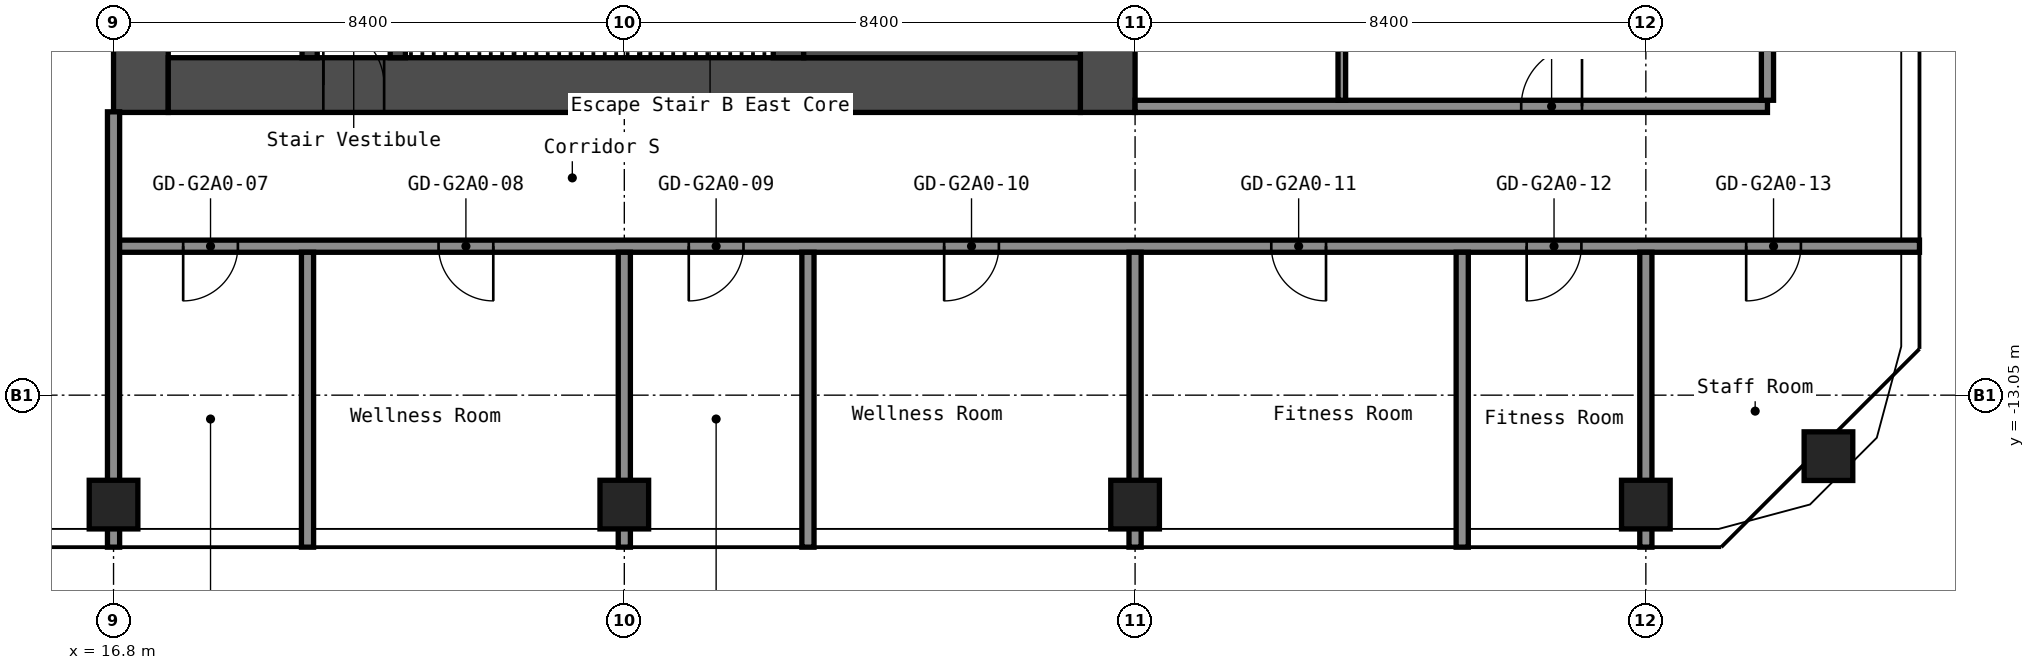
"""IFC4 building model, lengths in metres.
Left out: names, types, materials, properties, quantities, classifications, styles, units other than length and angle.
Written with IfcOpenShell. Run it as: python <this file> out.ifc"""

import sys

from ifc_helpers import new_model, si_unit, direction, frame, frame_2d, origin, origin_2d, place, context, subcontext, project, spatial, rectangle, hollow_rectangle, extrude, element, fill, save


model = new_model("IFC4")
c1 = context("Model", 3, precision=1e-05, world=origin(), true_north=direction((0.0, 1.0)))
c2 = subcontext(c1, "Body", "Model", "MODEL_VIEW")
j1 = project(units=[si_unit("LENGTHUNIT", "METRE"), si_unit("PLANEANGLEUNIT", "RADIAN")], contexts=[c1])
p1 = place(None, origin())
s1 = spatial("IfcSite", under=j1, at=p1, CompositionType="ELEMENT")
p2 = place(p1, origin())
s2 = spatial("IfcBuilding", under=s1, at=p2, CompositionType="ELEMENT")
p3 = place(p2, frame((0.0, 0.0, 75.4)))
s3 = spatial("IfcBuildingStorey", under=s2, at=p3, CompositionType="ELEMENT", Elevation=75.4)
for number, where, z_axis, x_axis in (
    (1, (16.8, -14.85, 0.0), (0.0, 0.0, 1.0), (1.0, 0.0, 0.0)),
    (2, (25.2, -14.85, 0.0), (0.0, 0.0, 1.0), (1.0, 0.0, 0.0)),
    (3, (33.6, -14.85, 0.0), (0.0, 0.0, 1.0), (1.0, 0.0, 0.0)),
    (4, (42.0, -14.85, 0.0), (0.0, 0.0, 1.0), (1.0, 0.0, 0.0)),
    (5, (45.003, -14.053, 0.0), (0.0, 0.0, 1.0), (1.0, 0.0, 0.0)),
):
    element("IfcColumn", number, at=place(p3, frame(where, z_axis=z_axis, x_axis=x_axis)), inside=s3, PredefinedType="COLUMN", context=c2, shape_type="SweptSolid", body=[
        extrude(hollow_rectangle(XDim=0.8, YDim=0.8, WallThickness=0.032, at=origin_2d()), origin(), (0.0, 0.0, 1.0), 2.8),
    ])
p4 = place(p3, frame((17.25, -8.4, 0.0), z_axis=(0.0, 0.0, 1.0), x_axis=(0.0, 1.0, 0.0)))
e6 = element("IfcWall", 6, at=p4, inside=s3, PredefinedType="SHEAR", context=c2, shape_type="SweptSolid", body=[
    extrude(rectangle(XDim=16.8, YDim=0.9, at=frame_2d((8.4, 0.0))), origin(), (0.0, 0.0, 1.0), 2.8),
])
p5 = place(p4, frame((7.6, 0.0, 0.0)))
e7 = element("IfcOpeningElement", 7, at=p5, cuts=e6, PredefinedType="OPENING", context=c2, shape_type="SweptSolid", body=[
    extrude(rectangle(XDim=1.2, YDim=2.1, at=frame_2d((0.6, 1.05))), frame((0.0, 0.46, 0.0), z_axis=(0.0, -1.0, 0.0), x_axis=(1.0, 0.0, 0.0)), (0.0, 0.0, 1.0), 0.92),
])
p6 = place(p3, frame((33.15, -8.4, 0.0), z_axis=(0.0, 0.0, 1.0), x_axis=(0.0, 1.0, 0.0)))
e8 = element("IfcWall", 8, at=p6, inside=s3, PredefinedType="SHEAR", context=c2, shape_type="SweptSolid", body=[
    extrude(rectangle(XDim=16.8, YDim=0.9, at=frame_2d((8.4, 0.0))), origin(), (0.0, 0.0, 1.0), 2.8),
])
p7 = place(p3, frame((17.7, -7.95, 0.0), z_axis=(0.0, 0.0, 1.0), x_axis=(1.0, 0.0, 0.0)))
e9 = element("IfcWall", 9, at=p7, inside=s3, PredefinedType="SHEAR", context=c2, shape_type="SweptSolid", body=[
    extrude(rectangle(XDim=15.0, YDim=0.9, at=frame_2d((7.5, 0.0))), origin(), (0.0, 0.0, 1.0), 2.8),
])
p8 = place(p7, frame((2.55, 0.0, 0.0)))
e10 = element("IfcOpeningElement", 10, at=p8, cuts=e9, PredefinedType="OPENING", context=c2, shape_type="SweptSolid", body=[
    extrude(rectangle(XDim=1.0, YDim=2.1, at=frame_2d((0.5, 1.05))), frame((0.0, 0.46, 0.0), z_axis=(0.0, -1.0, 0.0), x_axis=(1.0, 0.0, 0.0)), (0.0, 0.0, 1.0), 0.92),
])
p9 = place(p3, frame((20.025, -7.5, 0.0), z_axis=(0.0, 0.0, 1.0), x_axis=(0.0, 1.0, 0.0)))
e11 = element("IfcWall", 11, at=p9, inside=s3, PredefinedType="SHEAR", context=c2, shape_type="SweptSolid", body=[
    extrude(rectangle(XDim=6.3, YDim=0.25, at=frame_2d((3.15, 0.0))), origin(), (0.0, 0.0, 1.0), 2.8),
])
p10 = place(p9, frame((2.4, 0.0, 0.0)))
e12 = element("IfcOpeningElement", 12, at=p10, cuts=e11, PredefinedType="OPENING", context=c2, shape_type="SweptSolid", body=[
    extrude(rectangle(XDim=1.0, YDim=2.1, at=frame_2d((0.5, 1.05))), frame((0.0, 0.135, 0.0), z_axis=(0.0, -1.0, 0.0), x_axis=(1.0, 0.0, 0.0)), (0.0, 0.0, 1.0), 0.27),
])
p11 = place(p3, frame((21.475, -7.5, 0.0), z_axis=(0.0, 0.0, 1.0), x_axis=(0.0, 1.0, 0.0)))
e13 = element("IfcWall", 13, at=p11, inside=s3, PredefinedType="SHEAR", context=c2, shape_type="SweptSolid", body=[
    extrude(rectangle(XDim=3.75, YDim=0.25, at=frame_2d((1.875, 0.0))), origin(), (0.0, 0.0, 1.0), 2.8),
])
p12 = place(p11, frame((1.3, 0.0, 0.0)))
e14 = element("IfcOpeningElement", 14, at=p12, cuts=e13, PredefinedType="OPENING", context=c2, shape_type="SweptSolid", body=[
    extrude(rectangle(XDim=1.2, YDim=2.1, at=frame_2d((0.6, 1.05))), frame((0.0, 0.135, 0.0), z_axis=(0.0, -1.0, 0.0), x_axis=(1.0, 0.0, 0.0)), (0.0, 0.0, 1.0), 0.27),
])
p13 = place(p3, frame((27.9, -7.5, 0.0), z_axis=(0.0, 0.0, 1.0), x_axis=(0.0, 1.0, 0.0)))
e15 = element("IfcWall", 15, at=p13, inside=s3, PredefinedType="SHEAR", context=c2, shape_type="SweptSolid", body=[
    extrude(rectangle(XDim=3.75, YDim=0.5, at=frame_2d((1.875, 0.0))), origin(), (0.0, 0.0, 1.0), 2.8),
])
p14 = place(p3, frame((28.15, -6.75, 0.0), z_axis=(0.0, 0.0, 1.0), x_axis=(1.0, 0.0, 0.0)))
e16 = element("IfcWall", 16, at=p14, inside=s3, PredefinedType="SHEAR", context=c2, shape_type="SweptSolid", body=[
    extrude(rectangle(XDim=4.55, YDim=1.5, at=frame_2d((2.275, 0.0))), origin(), (0.0, 0.0, 1.0), 2.8),
])
p15 = place(p3, frame((16.8, -10.6, 0.0), z_axis=(0.0, 0.0, 1.0), x_axis=(1.0, 0.0, 0.0)))
e17 = element("IfcWall", 17, at=p15, inside=s3, PredefinedType="PARTITIONING", context=c2, shape_type="SweptSolid", body=[
    extrude(rectangle(XDim=29.7, YDim=0.2, at=frame_2d((14.85, 0.0))), origin(), (0.0, 0.0, 1.0), 2.8),
])
p16 = place(p15, frame((1.145, 0.0, 0.0)))
e18 = element("IfcOpeningElement", 18, at=p16, cuts=e17, PredefinedType="OPENING", context=c2, shape_type="SweptSolid", body=[
    extrude(rectangle(XDim=0.9, YDim=2.1, at=frame_2d((0.45, 1.05))), frame((0.0, 0.11, 0.0), z_axis=(0.0, -1.0, 0.0), x_axis=(1.0, 0.0, 0.0)), (0.0, 0.0, 1.0), 0.22),
])
p17 = place(p15, frame((5.345, 0.0, 0.0)))
e19 = element("IfcOpeningElement", 19, at=p17, cuts=e17, PredefinedType="OPENING", context=c2, shape_type="SweptSolid", body=[
    extrude(rectangle(XDim=0.9, YDim=2.1, at=frame_2d((0.45, 1.05))), frame((0.0, 0.11, 0.0), z_axis=(0.0, -1.0, 0.0), x_axis=(1.0, 0.0, 0.0)), (0.0, 0.0, 1.0), 0.22),
])
p18 = place(p15, frame((9.46, 0.0, 0.0)))
e20 = element("IfcOpeningElement", 20, at=p18, cuts=e17, PredefinedType="OPENING", context=c2, shape_type="SweptSolid", body=[
    extrude(rectangle(XDim=0.9, YDim=2.1, at=frame_2d((0.45, 1.05))), frame((0.0, 0.11, 0.0), z_axis=(0.0, -1.0, 0.0), x_axis=(1.0, 0.0, 0.0)), (0.0, 0.0, 1.0), 0.22),
])
p19 = place(p15, frame((13.66, 0.0, 0.0)))
e21 = element("IfcOpeningElement", 21, at=p19, cuts=e17, PredefinedType="OPENING", context=c2, shape_type="SweptSolid", body=[
    extrude(rectangle(XDim=0.9, YDim=2.1, at=frame_2d((0.45, 1.05))), frame((0.0, 0.11, 0.0), z_axis=(0.0, -1.0, 0.0), x_axis=(1.0, 0.0, 0.0)), (0.0, 0.0, 1.0), 0.22),
])
p20 = place(p15, frame((19.04, 0.0, 0.0)))
e22 = element("IfcOpeningElement", 22, at=p20, cuts=e17, PredefinedType="OPENING", context=c2, shape_type="SweptSolid", body=[
    extrude(rectangle(XDim=0.9, YDim=2.1, at=frame_2d((0.45, 1.05))), frame((0.0, 0.11, 0.0), z_axis=(0.0, -1.0, 0.0), x_axis=(1.0, 0.0, 0.0)), (0.0, 0.0, 1.0), 0.22),
])
p21 = place(p15, frame((23.24, 0.0, 0.0)))
e23 = element("IfcOpeningElement", 23, at=p21, cuts=e17, PredefinedType="OPENING", context=c2, shape_type="SweptSolid", body=[
    extrude(rectangle(XDim=0.9, YDim=2.1, at=frame_2d((0.45, 1.05))), frame((0.0, 0.11, 0.0), z_axis=(0.0, -1.0, 0.0), x_axis=(1.0, 0.0, 0.0)), (0.0, 0.0, 1.0), 0.22),
])
p22 = place(p15, frame((26.85, 0.0, 0.0)))
e24 = element("IfcOpeningElement", 24, at=p22, cuts=e17, PredefinedType="OPENING", context=c2, shape_type="SweptSolid", body=[
    extrude(rectangle(XDim=0.9, YDim=2.1, at=frame_2d((0.45, 1.05))), frame((0.0, 0.11, 0.0), z_axis=(0.0, -1.0, 0.0), x_axis=(1.0, 0.0, 0.0)), (0.0, 0.0, 1.0), 0.22),
])
p23 = place(p3, frame((33.6, -8.3, 0.0), z_axis=(0.0, 0.0, 1.0), x_axis=(1.0, 0.0, 0.0)))
e25 = element("IfcWall", 25, at=p23, inside=s3, PredefinedType="PARTITIONING", context=c2, shape_type="SweptSolid", body=[
    extrude(rectangle(XDim=10.4, YDim=0.2, at=frame_2d((5.2, 0.0))), origin(), (0.0, 0.0, 1.0), 2.8),
])
p24 = place(p23, frame((6.35, 0.0, 0.0)))
e26 = element("IfcOpeningElement", 26, at=p24, cuts=e25, PredefinedType="OPENING", context=c2, shape_type="SweptSolid", body=[
    extrude(rectangle(XDim=1.0, YDim=2.1, at=frame_2d((0.5, 1.05))), frame((0.0, 0.11, 0.0), z_axis=(0.0, -1.0, 0.0), x_axis=(1.0, 0.0, 0.0)), (0.0, 0.0, 1.0), 0.22),
])
p25 = place(p3, frame((16.8, -15.55, 0.0), z_axis=(0.0, 0.0, 1.0), x_axis=(0.0, 1.0, 0.0)))
e27 = element("IfcWall", 27, at=p25, inside=s3, PredefinedType="PARTITIONING", context=c2, shape_type="SweptSolid", body=[
    extrude(rectangle(XDim=7.16, YDim=0.2, at=frame_2d((3.58, 0.0))), origin(), (0.0, 0.0, 1.0), 2.8),
])
for number, where, z_axis, x_axis in (
    (28, (19.99, -15.55, 0.0), (0.0, 0.0, 1.0), (0.0, 1.0, 0.0)),
    (29, (25.2, -15.55, 0.0), (0.0, 0.0, 1.0), (0.0, 1.0, 0.0)),
    (30, (28.22, -15.55, 0.0), (0.0, 0.0, 1.0), (0.0, 1.0, 0.0)),
    (31, (33.6, -15.55, 0.0), (0.0, 0.0, 1.0), (0.0, 1.0, 0.0)),
):
    element("IfcWall", number, at=place(p3, frame(where, z_axis=z_axis, x_axis=x_axis)), inside=s3, PredefinedType="PARTITIONING", context=c2, shape_type="SweptSolid", body=[
        extrude(rectangle(XDim=4.85, YDim=0.2, at=frame_2d((2.425, 0.0))), origin(), (0.0, 0.0, 1.0), 2.8),
    ])
p26 = place(p3, frame((37.0, -8.2, 0.0), z_axis=(0.0, 0.0, 1.0), x_axis=(0.0, 1.0, 0.0)))
e32 = element("IfcWall", 32, at=p26, inside=s3, PredefinedType="PARTITIONING", context=c2, shape_type="SweptSolid", body=[
    extrude(rectangle(XDim=3.3, YDim=0.125, at=frame_2d((1.65, 0.0))), origin(), (0.0, 0.0, 1.0), 2.8),
])
for number, where, z_axis, x_axis in (
    (33, (38.98, -15.55, 0.0), (0.0, 0.0, 1.0), (0.0, 1.0, 0.0)),
    (34, (42.0, -15.55, 0.0), (0.0, 0.0, 1.0), (0.0, 1.0, 0.0)),
):
    element("IfcWall", number, at=place(p3, frame(where, z_axis=z_axis, x_axis=x_axis)), inside=s3, PredefinedType="PARTITIONING", context=c2, shape_type="SweptSolid", body=[
        extrude(rectangle(XDim=4.85, YDim=0.2, at=frame_2d((2.425, 0.0))), origin(), (0.0, 0.0, 1.0), 2.8),
    ])
p27 = place(p3, frame((44.0, -8.2, 0.0), z_axis=(0.0, 0.0, 1.0), x_axis=(0.0, 1.0, 0.0)))
e35 = element("IfcWall", 35, at=p27, inside=s3, PredefinedType="PARTITIONING", context=c2, shape_type="SweptSolid", body=[
    extrude(rectangle(XDim=16.4, YDim=0.2, at=frame_2d((8.2, 0.0))), origin(), (0.0, 0.0, 1.0), 2.8),
])
p28 = place(p8, origin())
e36 = element("IfcDoor", 36, at=p28, inside=s3, OperationType="SINGLE_SWING_RIGHT", PredefinedType="DOOR", context=c2, shape_type="SweptSolid", body=[
    extrude(rectangle(XDim=1.0, YDim=2.1, at=frame_2d((0.5, 1.05))), frame((0.0, 0.025, 0.0), z_axis=(0.0, -1.0, 0.0), x_axis=(1.0, 0.0, 0.0)), (0.0, 0.0, 1.0), 0.05),
])
fill(e10, e36)
p29 = place(p16, origin())
e37 = element("IfcDoor", 37, at=p29, inside=s3, OperationType="SINGLE_SWING_LEFT", PredefinedType="DOOR", context=c2, shape_type="SweptSolid", body=[
    extrude(rectangle(XDim=0.9, YDim=2.1, at=frame_2d((0.45, 1.05))), frame((0.0, 0.025, 0.0), z_axis=(0.0, -1.0, 0.0), x_axis=(1.0, 0.0, 0.0)), (0.0, 0.0, 1.0), 0.05),
])
fill(e18, e37)
p30 = place(p17, origin())
e38 = element("IfcDoor", 38, at=p30, inside=s3, OperationType="SINGLE_SWING_RIGHT", PredefinedType="DOOR", context=c2, shape_type="SweptSolid", body=[
    extrude(rectangle(XDim=0.9, YDim=2.1, at=frame_2d((0.45, 1.05))), frame((0.0, 0.025, 0.0), z_axis=(0.0, -1.0, 0.0), x_axis=(1.0, 0.0, 0.0)), (0.0, 0.0, 1.0), 0.05),
])
fill(e19, e38)
p31 = place(p18, origin())
e39 = element("IfcDoor", 39, at=p31, inside=s3, OperationType="SINGLE_SWING_LEFT", PredefinedType="DOOR", context=c2, shape_type="SweptSolid", body=[
    extrude(rectangle(XDim=0.9, YDim=2.1, at=frame_2d((0.45, 1.05))), frame((0.0, 0.025, 0.0), z_axis=(0.0, -1.0, 0.0), x_axis=(1.0, 0.0, 0.0)), (0.0, 0.0, 1.0), 0.05),
])
fill(e20, e39)
p32 = place(p19, origin())
e40 = element("IfcDoor", 40, at=p32, inside=s3, OperationType="SINGLE_SWING_LEFT", PredefinedType="DOOR", context=c2, shape_type="SweptSolid", body=[
    extrude(rectangle(XDim=0.9, YDim=2.1, at=frame_2d((0.45, 1.05))), frame((0.0, 0.025, 0.0), z_axis=(0.0, -1.0, 0.0), x_axis=(1.0, 0.0, 0.0)), (0.0, 0.0, 1.0), 0.05),
])
fill(e21, e40)
p33 = place(p20, origin())
e41 = element("IfcDoor", 41, at=p33, inside=s3, OperationType="SINGLE_SWING_RIGHT", PredefinedType="DOOR", context=c2, shape_type="SweptSolid", body=[
    extrude(rectangle(XDim=0.9, YDim=2.1, at=frame_2d((0.45, 1.05))), frame((0.0, 0.025, 0.0), z_axis=(0.0, -1.0, 0.0), x_axis=(1.0, 0.0, 0.0)), (0.0, 0.0, 1.0), 0.05),
])
fill(e22, e41)
p34 = place(p21, origin())
e42 = element("IfcDoor", 42, at=p34, inside=s3, OperationType="SINGLE_SWING_LEFT", PredefinedType="DOOR", context=c2, shape_type="SweptSolid", body=[
    extrude(rectangle(XDim=0.9, YDim=2.1, at=frame_2d((0.45, 1.05))), frame((0.0, 0.025, 0.0), z_axis=(0.0, -1.0, 0.0), x_axis=(1.0, 0.0, 0.0)), (0.0, 0.0, 1.0), 0.05),
])
fill(e23, e42)
p35 = place(p22, origin())
e43 = element("IfcDoor", 43, at=p35, inside=s3, OperationType="SINGLE_SWING_LEFT", PredefinedType="DOOR", context=c2, shape_type="SweptSolid", body=[
    extrude(rectangle(XDim=0.9, YDim=2.1, at=frame_2d((0.45, 1.05))), frame((0.0, 0.025, 0.0), z_axis=(0.0, -1.0, 0.0), x_axis=(1.0, 0.0, 0.0)), (0.0, 0.0, 1.0), 0.05),
])
fill(e24, e43)
p36 = place(p24, origin())
e44 = element("IfcDoor", 44, at=p36, inside=s3, OperationType="SINGLE_SWING_LEFT", PredefinedType="DOOR", context=c2, shape_type="SweptSolid", body=[
    extrude(rectangle(XDim=1.0, YDim=2.1, at=frame_2d((0.5, 1.05))), frame((0.0, 0.025, 0.0), z_axis=(0.0, -1.0, 0.0), x_axis=(1.0, 0.0, 0.0)), (0.0, 0.0, 1.0), 0.05),
])
fill(e26, e44)
save(model, sys.argv[1])
